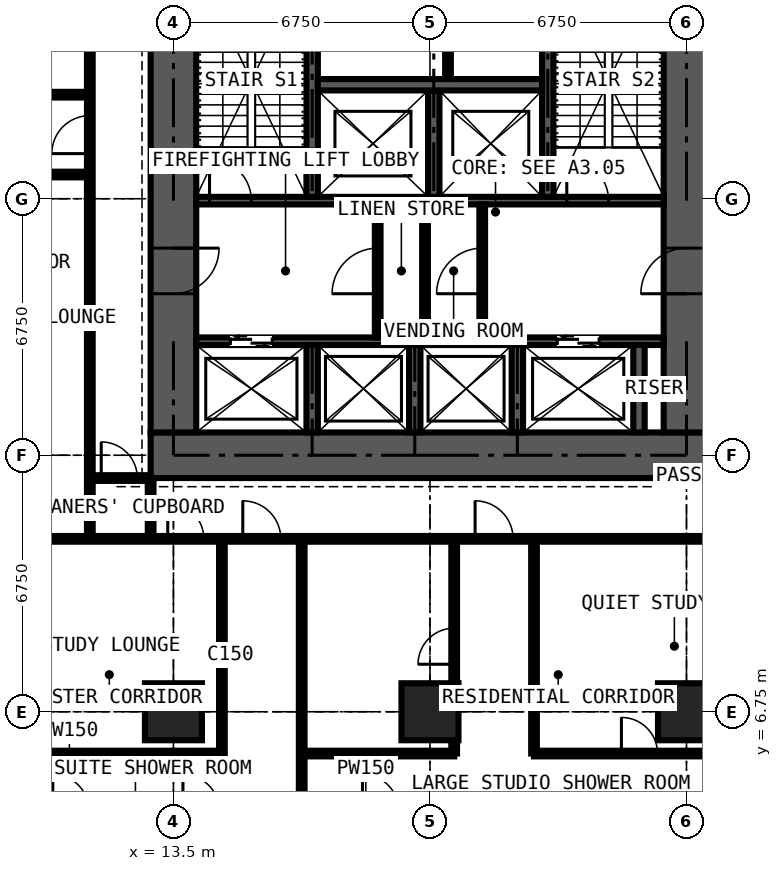
"""IFC4 building model, lengths in metres.
Left out: names, types, materials, properties, quantities, classifications, styles, units other than length and angle.
Written with IfcOpenShell. Run it as: python <this file> out.ifc"""

import sys

from ifc_helpers import new_model, si_unit, direction, frame, frame_2d, origin, origin_2d, place, context, subcontext, project, spatial, rectangle, extrude, element, fill, save


model = new_model("IFC4")
c1 = context("Model", 3, precision=1e-05, world=origin(), true_north=direction((0.0, 1.0)))
c2 = subcontext(c1, "Body", "Model", "MODEL_VIEW")
j1 = project(units=[si_unit("LENGTHUNIT", "METRE"), si_unit("PLANEANGLEUNIT", "RADIAN")], contexts=[c1])
p1 = place(None, origin())
s1 = spatial("IfcSite", under=j1, at=p1, CompositionType="ELEMENT")
p2 = place(p1, origin())
s2 = spatial("IfcBuilding", under=s1, at=p2, CompositionType="ELEMENT")
p3 = place(p2, frame((0.0, 0.0, 130.5)))
s3 = spatial("IfcBuildingStorey", under=s2, at=p3, CompositionType="ELEMENT", Elevation=130.5)
for number, where, z_axis, x_axis in (
    (1, (13.5, 6.75, 0.0), (0.0, 0.0, 1.0), (1.0, 0.0, 0.0)),
    (2, (20.25, 6.75, 0.0), (0.0, 0.0, 1.0), (1.0, 0.0, 0.0)),
    (3, (27.0, 6.75, 0.0), (0.0, 0.0, 1.0), (1.0, 0.0, 0.0)),
):
    element("IfcColumn", number, at=place(p3, frame(where, z_axis=z_axis, x_axis=x_axis)), inside=s3, PredefinedType="COLUMN", context=c2, shape_type="SweptSolid", body=[
        extrude(rectangle(XDim=1.5, YDim=1.5, at=origin_2d()), origin(), (0.0, 0.0, 1.0), 3.6),
    ])
p4 = place(p3, frame((12.9, 13.5, 0.0), z_axis=(0.0, 0.0, 1.0), x_axis=(1.0, 0.0, 0.0)))
e4 = element("IfcWall", 4, at=p4, inside=s3, PredefinedType="SHEAR", context=c2, shape_type="SweptSolid", body=[
    extrude(rectangle(XDim=14.7, YDim=1.2, at=frame_2d((7.35, 0.0))), origin(), (0.0, 0.0, 1.0), 3.6),
])
p5 = place(p3, frame((27.0, 14.1, 0.0), z_axis=(0.0, 0.0, 1.0), x_axis=(0.0, 1.0, 0.0)))
e5 = element("IfcWall", 5, at=p5, inside=s3, PredefinedType="SHEAR", context=c2, shape_type="SweptSolid", body=[
    extrude(rectangle(XDim=12.3, YDim=1.2, at=frame_2d((6.15, 0.0))), origin(), (0.0, 0.0, 1.0), 3.6),
])
p6 = place(p5, frame((3.65, 0.0, 0.0)))
e6 = element("IfcOpeningElement", 6, at=p6, cuts=e5, PredefinedType="OPENING", context=c2, shape_type="SweptSolid", body=[
    extrude(rectangle(XDim=1.2, YDim=2.2, at=frame_2d((0.6, 1.1))), frame((0.0, 0.61, 0.0), z_axis=(0.0, -1.0, 0.0), x_axis=(1.0, 0.0, 0.0)), (0.0, 0.0, 1.0), 1.22),
])
p7 = place(p3, frame((13.5, 26.4, 0.0), z_axis=(0.0, 0.0, 1.0), x_axis=(0.0, -1.0, 0.0)))
e7 = element("IfcWall", 7, at=p7, inside=s3, PredefinedType="SHEAR", context=c2, shape_type="SweptSolid", body=[
    extrude(rectangle(XDim=12.3, YDim=1.2, at=frame_2d((6.15, 0.0))), origin(), (0.0, 0.0, 1.0), 3.6),
])
p8 = place(p7, frame((7.45, 0.0, 0.0)))
e8 = element("IfcOpeningElement", 8, at=p8, cuts=e7, PredefinedType="OPENING", context=c2, shape_type="SweptSolid", body=[
    extrude(rectangle(XDim=1.2, YDim=2.2, at=frame_2d((0.6, 1.1))), frame((0.0, 0.61, 0.0), z_axis=(0.0, -1.0, 0.0), x_axis=(1.0, 0.0, 0.0)), (0.0, 0.0, 1.0), 1.22),
])
p9 = place(p3, frame((14.1, 16.5, 0.0), z_axis=(0.0, 0.0, 1.0), x_axis=(1.0, 0.0, 0.0)))
e9 = element("IfcWall", 9, at=p9, inside=s3, PredefinedType="SHEAR", context=c2, shape_type="SweptSolid", body=[
    extrude(rectangle(XDim=12.3, YDim=0.2, at=frame_2d((6.15, 0.0))), origin(), (0.0, 0.0, 1.0), 3.6),
])
p10 = place(p9, frame((0.9, 0.0, 0.0)))
e10 = element("IfcOpeningElement", 10, at=p10, cuts=e9, PredefinedType="OPENING", context=c2, shape_type="SweptSolid", body=[
    extrude(rectangle(XDim=1.1, YDim=2.2, at=frame_2d((0.55, 1.1))), frame((0.0, 0.11, 0.0), z_axis=(0.0, -1.0, 0.0), x_axis=(1.0, 0.0, 0.0)), (0.0, 0.0, 1.0), 0.22),
])
p11 = place(p9, frame((9.5, 0.0, 0.0)))
e11 = element("IfcOpeningElement", 11, at=p11, cuts=e9, PredefinedType="OPENING", context=c2, shape_type="SweptSolid", body=[
    extrude(rectangle(XDim=1.1, YDim=2.2, at=frame_2d((0.55, 1.1))), frame((0.0, 0.11, 0.0), z_axis=(0.0, -1.0, 0.0), x_axis=(1.0, 0.0, 0.0)), (0.0, 0.0, 1.0), 0.22),
])
p12 = place(p3, frame((14.1, 20.2, 0.0), z_axis=(0.0, 0.0, 1.0), x_axis=(1.0, 0.0, 0.0)))
e12 = element("IfcWall", 12, at=p12, inside=s3, PredefinedType="SHEAR", context=c2, shape_type="SweptSolid", body=[
    extrude(rectangle(XDim=12.3, YDim=0.2, at=frame_2d((6.15, 0.0))), origin(), (0.0, 0.0, 1.0), 3.6),
])
p13 = place(p12, frame((0.35, 0.0, 0.0)))
e13 = element("IfcOpeningElement", 13, at=p13, cuts=e12, PredefinedType="OPENING", context=c2, shape_type="SweptSolid", body=[
    extrude(rectangle(XDim=1.1, YDim=2.2, at=frame_2d((0.55, 1.1))), frame((0.0, 0.11, 0.0), z_axis=(0.0, -1.0, 0.0), x_axis=(1.0, 0.0, 0.0)), (0.0, 0.0, 1.0), 0.22),
])
p14 = place(p12, frame((9.75, 0.0, 0.0)))
e14 = element("IfcOpeningElement", 14, at=p14, cuts=e12, PredefinedType="OPENING", context=c2, shape_type="SweptSolid", body=[
    extrude(rectangle(XDim=1.1, YDim=2.2, at=frame_2d((0.55, 1.1))), frame((0.0, 0.11, 0.0), z_axis=(0.0, -1.0, 0.0), x_axis=(1.0, 0.0, 0.0)), (0.0, 0.0, 1.0), 0.22),
])
for number, where, z_axis, x_axis in (
    (15, (17.15, 20.3, 0.0), (0.0, 0.0, 1.0), (0.0, 1.0, 0.0)),
    (16, (23.35, 20.3, 0.0), (0.0, 0.0, 1.0), (0.0, 1.0, 0.0)),
):
    element("IfcWall", number, at=place(p3, frame(where, z_axis=z_axis, x_axis=x_axis)), inside=s3, PredefinedType="SHEAR", context=c2, shape_type="SweptSolid", body=[
        extrude(rectangle(XDim=6.1, YDim=0.3, at=frame_2d((3.05, 0.0))), origin(), (0.0, 0.0, 1.0), 3.6),
    ])
p15 = place(p3, frame((20.35, 20.3, 0.0), z_axis=(0.0, 0.0, 1.0), x_axis=(0.0, 1.0, 0.0)))
e17 = element("IfcWall", 17, at=p15, inside=s3, PredefinedType="SHEAR", context=c2, shape_type="SweptSolid", body=[
    extrude(rectangle(XDim=2.8, YDim=0.3, at=frame_2d((1.4, 0.0))), origin(), (0.0, 0.0, 1.0), 3.6),
])
p16 = place(p3, frame((17.3, 23.25, 0.0), z_axis=(0.0, 0.0, 1.0), x_axis=(1.0, 0.0, 0.0)))
e18 = element("IfcWall", 18, at=p16, inside=s3, PredefinedType="SHEAR", context=c2, shape_type="SweptSolid", body=[
    extrude(rectangle(XDim=5.9, YDim=0.3, at=frame_2d((2.95, 0.0))), origin(), (0.0, 0.0, 1.0), 3.6),
])
for number, where, z_axis, x_axis in (
    (19, (17.15, 14.1, 0.0), (0.0, 0.0, 1.0), (0.0, 1.0, 0.0)),
    (20, (19.85, 14.1, 0.0), (0.0, 0.0, 1.0), (0.0, 1.0, 0.0)),
    (21, (22.55, 14.1, 0.0), (0.0, 0.0, 1.0), (0.0, 1.0, 0.0)),
    (22, (25.75, 14.1, 0.0), (0.0, 0.0, 1.0), (0.0, 1.0, 0.0)),
):
    element("IfcWall", number, at=place(p3, frame(where, z_axis=z_axis, x_axis=x_axis)), inside=s3, PredefinedType="SHEAR", context=c2, shape_type="SweptSolid", body=[
        extrude(rectangle(XDim=2.3, YDim=0.3, at=frame_2d((1.15, 0.0))), origin(), (0.0, 0.0, 1.0), 3.6),
    ])
p17 = place(p3, frame((18.875, 16.6, 0.0), z_axis=(0.0, 0.0, 1.0), x_axis=(0.0, 1.0, 0.0)))
e23 = element("IfcWall", 23, at=p17, inside=s3, PredefinedType="PARTITIONING", context=c2, shape_type="SweptSolid", body=[
    extrude(rectangle(XDim=3.5, YDim=0.15, at=frame_2d((1.75, 0.0))), origin(), (0.0, 0.0, 1.0), 3.375),
])
p18 = place(p17, frame((1.15, 0.0, 0.0)))
e24 = element("IfcOpeningElement", 24, at=p18, cuts=e23, PredefinedType="OPENING", context=c2, shape_type="SweptSolid", body=[
    extrude(rectangle(XDim=1.2, YDim=2.2, at=frame_2d((0.6, 1.1))), frame((0.0, 0.085, 0.0), z_axis=(0.0, -1.0, 0.0), x_axis=(1.0, 0.0, 0.0)), (0.0, 0.0, 1.0), 0.17),
])
p19 = place(p3, frame((21.625, 16.6, 0.0), z_axis=(0.0, 0.0, 1.0), x_axis=(0.0, 1.0, 0.0)))
e25 = element("IfcWall", 25, at=p19, inside=s3, PredefinedType="PARTITIONING", context=c2, shape_type="SweptSolid", body=[
    extrude(rectangle(XDim=3.5, YDim=0.15, at=frame_2d((1.75, 0.0))), origin(), (0.0, 0.0, 1.0), 3.375),
])
p20 = place(p19, frame((1.15, 0.0, 0.0)))
e26 = element("IfcOpeningElement", 26, at=p20, cuts=e25, PredefinedType="OPENING", context=c2, shape_type="SweptSolid", body=[
    extrude(rectangle(XDim=1.2, YDim=2.2, at=frame_2d((0.6, 1.1))), frame((0.0, 0.085, 0.0), z_axis=(0.0, -1.0, 0.0), x_axis=(1.0, 0.0, 0.0)), (0.0, 0.0, 1.0), 0.17),
])
p21 = place(p3, frame((20.12, 16.6, 0.0), z_axis=(0.0, 0.0, 1.0), x_axis=(0.0, 1.0, 0.0)))
e27 = element("IfcWall", 27, at=p21, inside=s3, PredefinedType="PARTITIONING", context=c2, shape_type="SweptSolid", body=[
    extrude(rectangle(XDim=3.5, YDim=0.15, at=frame_2d((1.75, 0.0))), origin(), (0.0, 0.0, 1.0), 3.375),
])
p22 = place(p3, frame((20.725, 23.4, 0.0), z_axis=(0.0, 0.0, 1.0), x_axis=(0.0, 1.0, 0.0)))
e28 = element("IfcWall", 28, at=p22, inside=s3, PredefinedType="PARTITIONING", context=c2, shape_type="SweptSolid", body=[
    extrude(rectangle(XDim=3.0, YDim=0.15, at=frame_2d((1.5, 0.0))), origin(), (0.0, 0.0, 1.0), 3.375),
])
p23 = place(p3, frame((5.65, 20.887, 0.0), z_axis=(0.0, 0.0, 1.0), x_axis=(1.0, 0.0, 0.0)))
e29 = element("IfcWall", 29, at=p23, inside=s3, PredefinedType="PARTITIONING", context=c2, shape_type="SweptSolid", body=[
    extrude(rectangle(XDim=5.65, YDim=0.15, at=frame_2d((2.825, 0.0))), origin(), (0.0, 0.0, 1.0), 3.375),
])
p24 = place(p3, frame((5.65, 22.988, 0.0), z_axis=(0.0, 0.0, 1.0), x_axis=(1.0, 0.0, 0.0)))
e30 = element("IfcWall", 30, at=p24, inside=s3, PredefinedType="PARTITIONING", context=c2, shape_type="SweptSolid", body=[
    extrude(rectangle(XDim=5.65, YDim=0.15, at=frame_2d((2.825, 0.0))), origin(), (0.0, 0.0, 1.0), 3.375),
])
p25 = place(p24, frame((2.35, 0.0, 0.0)))
e31 = element("IfcOpeningElement", 31, at=p25, cuts=e30, PredefinedType="OPENING", context=c2, shape_type="SweptSolid", body=[
    extrude(rectangle(XDim=0.95, YDim=2.2, at=frame_2d((0.475, 1.1))), frame((0.0, 0.085, 0.0), z_axis=(0.0, -1.0, 0.0), x_axis=(1.0, 0.0, 0.0)), (0.0, 0.0, 1.0), 0.17),
])
p26 = place(p3, frame((6.75, 5.65, 0.0), z_axis=(0.0, 0.0, 1.0), x_axis=(1.0, 0.0, 0.0)))
e32 = element("IfcWall", 32, at=p26, inside=s3, PredefinedType="PARTITIONING", context=c2, shape_type="SweptSolid", body=[
    extrude(rectangle(XDim=8.025, YDim=0.15, at=frame_2d((4.012, 0.0))), origin(), (0.0, 0.0, 1.0), 3.375),
])
p27 = place(p3, frame((10.125, 11.3, 0.0), z_axis=(0.0, 0.0, 1.0), x_axis=(1.0, 0.0, 0.0)))
e33 = element("IfcWall", 33, at=p27, inside=s3, PredefinedType="PARTITIONING", context=c2, shape_type="SweptSolid", body=[
    extrude(rectangle(XDim=20.675, YDim=0.15, at=frame_2d((10.337, 0.0))), origin(), (0.0, 0.0, 1.0), 3.375),
])
p28 = place(p27, frame((5.2, 0.0, 0.0)))
e34 = element("IfcOpeningElement", 34, at=p28, cuts=e33, PredefinedType="OPENING", context=c2, shape_type="SweptSolid", body=[
    extrude(rectangle(XDim=1.0, YDim=2.2, at=frame_2d((0.5, 1.1))), frame((0.0, 0.085, 0.0), z_axis=(0.0, -1.0, 0.0), x_axis=(1.0, 0.0, 0.0)), (0.0, 0.0, 1.0), 0.17),
])
p29 = place(p27, frame((11.312, 0.0, 0.0)))
e35 = element("IfcOpeningElement", 35, at=p29, cuts=e33, PredefinedType="OPENING", context=c2, shape_type="SweptSolid", body=[
    extrude(rectangle(XDim=1.0, YDim=2.2, at=frame_2d((0.5, 1.1))), frame((0.0, 0.085, 0.0), z_axis=(0.0, -1.0, 0.0), x_axis=(1.0, 0.0, 0.0)), (0.0, 0.0, 1.0), 0.17),
])
p30 = place(p27, frame((3.225, 0.0, 0.0)))
e36 = element("IfcOpeningElement", 36, at=p30, cuts=e33, PredefinedType="OPENING", context=c2, shape_type="SweptSolid", body=[
    extrude(rectangle(XDim=0.95, YDim=2.2, at=frame_2d((0.475, 1.1))), frame((0.0, 0.085, 0.0), z_axis=(0.0, -1.0, 0.0), x_axis=(1.0, 0.0, 0.0)), (0.0, 0.0, 1.0), 0.17),
])
p31 = place(p3, frame((11.3, 11.3, 0.0), z_axis=(0.0, 0.0, 1.0), x_axis=(0.0, 1.0, 0.0)))
e37 = element("IfcWall", 37, at=p31, inside=s3, PredefinedType="PARTITIONING", context=c2, shape_type="SweptSolid", body=[
    extrude(rectangle(XDim=19.3, YDim=0.15, at=frame_2d((9.65, 0.0))), origin(), (0.0, 0.0, 1.0), 3.375),
])
p32 = place(p31, frame((18.1, 0.0, 0.0)))
e38 = element("IfcOpeningElement", 38, at=p32, cuts=e37, PredefinedType="OPENING", context=c2, shape_type="SweptSolid", body=[
    extrude(rectangle(XDim=1.0, YDim=2.2, at=frame_2d((0.5, 1.1))), frame((0.0, 0.085, 0.0), z_axis=(0.0, -1.0, 0.0), x_axis=(1.0, 0.0, 0.0)), (0.0, 0.0, 1.0), 0.17),
])
p33 = place(p31, frame((10.137, 0.0, 0.0)))
e39 = element("IfcOpeningElement", 39, at=p33, cuts=e37, PredefinedType="OPENING", context=c2, shape_type="SweptSolid", body=[
    extrude(rectangle(XDim=1.0, YDim=2.2, at=frame_2d((0.5, 1.1))), frame((0.0, 0.085, 0.0), z_axis=(0.0, -1.0, 0.0), x_axis=(1.0, 0.0, 0.0)), (0.0, 0.0, 1.0), 0.17),
])
p34 = place(p3, frame((11.3, 12.9, 0.0), z_axis=(0.0, 0.0, 1.0), x_axis=(1.0, 0.0, 0.0)))
e40 = element("IfcWall", 40, at=p34, inside=s3, PredefinedType="PARTITIONING", context=c2, shape_type="SweptSolid", body=[
    extrude(rectangle(XDim=1.6, YDim=0.15, at=frame_2d((0.8, 0.0))), origin(), (0.0, 0.0, 1.0), 2.806),
])
p35 = place(p34, frame((0.3, 0.0, 0.0)))
e41 = element("IfcOpeningElement", 41, at=p35, cuts=e40, PredefinedType="OPENING", context=c2, shape_type="SweptSolid", body=[
    extrude(rectangle(XDim=0.95, YDim=2.2, at=frame_2d((0.475, 1.1))), frame((0.0, 0.085, 0.0), z_axis=(0.0, -1.0, 0.0), x_axis=(1.0, 0.0, 0.0)), (0.0, 0.0, 1.0), 0.17),
])
p36 = place(p3, frame((12.9, 11.3, 0.0), z_axis=(0.0, 0.0, 1.0), x_axis=(0.0, 1.0, 0.0)))
e42 = element("IfcWall", 42, at=p36, inside=s3, PredefinedType="PARTITIONING", context=c2, shape_type="SweptSolid", body=[
    extrude(rectangle(XDim=1.6, YDim=0.15, at=frame_2d((0.8, 0.0))), origin(), (0.0, 0.0, 1.0), 3.375),
])
p37 = place(p3, frame((14.775, 5.65, 0.0), z_axis=(0.0, 0.0, 1.0), x_axis=(0.0, 1.0, 0.0)))
e43 = element("IfcWall", 43, at=p37, inside=s3, PredefinedType="PARTITIONING", context=c2, shape_type="SweptSolid", body=[
    extrude(rectangle(XDim=5.65, YDim=0.15, at=frame_2d((2.825, 0.0))), origin(), (0.0, 0.0, 1.0), 3.375),
])
p38 = place(p3, frame((16.875, -0.734, 0.0), z_axis=(0.0, 0.0, 1.0), x_axis=(0.0, 1.0, 0.0)))
e44 = element("IfcWall", 44, at=p38, inside=s3, PredefinedType="PARTITIONING", context=c2, shape_type="SweptSolid", body=[
    extrude(rectangle(XDim=12.034, YDim=0.15, at=frame_2d((6.017, 0.0))), origin(), (0.0, 0.0, 1.0), 3.375),
])
p39 = place(p3, frame((16.875, 5.65, 0.0), z_axis=(0.0, 0.0, 1.0), x_axis=(1.0, 0.0, 0.0)))
e45 = element("IfcWall", 45, at=p39, inside=s3, PredefinedType="PARTITIONING", context=c2, shape_type="SweptSolid", body=[
    extrude(rectangle(XDim=4.012, YDim=0.15, at=frame_2d((2.006, 0.0))), origin(), (0.0, 0.0, 1.0), 3.375),
])
p40 = place(p3, frame((20.887, 5.65, 0.0), z_axis=(0.0, 0.0, 1.0), x_axis=(0.0, 1.0, 0.0)))
e46 = element("IfcWall", 46, at=p40, inside=s3, PredefinedType="PARTITIONING", context=c2, shape_type="SweptSolid", body=[
    extrude(rectangle(XDim=5.65, YDim=0.15, at=frame_2d((2.825, 0.0))), origin(), (0.0, 0.0, 1.0), 3.375),
])
p41 = place(p40, frame((2.35, 0.0, 0.0)))
e47 = element("IfcOpeningElement", 47, at=p41, cuts=e46, PredefinedType="OPENING", context=c2, shape_type="SweptSolid", body=[
    extrude(rectangle(XDim=0.95, YDim=2.2, at=frame_2d((0.475, 1.1))), frame((0.0, 0.085, 0.0), z_axis=(0.0, -1.0, 0.0), x_axis=(1.0, 0.0, 0.0)), (0.0, 0.0, 1.0), 0.17),
])
p42 = place(p3, frame((22.988, 5.65, 0.0), z_axis=(0.0, 0.0, 1.0), x_axis=(1.0, 0.0, 0.0)))
e48 = element("IfcWall", 48, at=p42, inside=s3, PredefinedType="PARTITIONING", context=c2, shape_type="SweptSolid", body=[
    extrude(rectangle(XDim=7.387, YDim=0.15, at=frame_2d((3.694, 0.0))), origin(), (0.0, 0.0, 1.0), 3.375),
])
p43 = place(p42, frame((2.3, 0.0, 0.0)))
e49 = element("IfcOpeningElement", 49, at=p43, cuts=e48, PredefinedType="OPENING", context=c2, shape_type="SweptSolid", body=[
    extrude(rectangle(XDim=0.95, YDim=2.2, at=frame_2d((0.475, 1.1))), frame((0.0, 0.085, 0.0), z_axis=(0.0, -1.0, 0.0), x_axis=(1.0, 0.0, 0.0)), (0.0, 0.0, 1.0), 0.17),
])
p44 = place(p3, frame((22.988, 5.65, 0.0), z_axis=(0.0, 0.0, 1.0), x_axis=(0.0, 1.0, 0.0)))
e50 = element("IfcWall", 50, at=p44, inside=s3, PredefinedType="PARTITIONING", context=c2, shape_type="SweptSolid", body=[
    extrude(rectangle(XDim=5.65, YDim=0.15, at=frame_2d((2.825, 0.0))), origin(), (0.0, 0.0, 1.0), 3.375),
])
p45 = place(p10, origin())
e51 = element("IfcDoor", 51, at=p45, inside=s3, OperationType="DOUBLE_DOOR_SLIDING", PredefinedType="DOOR", context=c2, shape_type="SweptSolid", body=[
    extrude(rectangle(XDim=1.1, YDim=2.2, at=frame_2d((0.55, 1.1))), frame((0.0, 0.025, 0.0), z_axis=(0.0, -1.0, 0.0), x_axis=(1.0, 0.0, 0.0)), (0.0, 0.0, 1.0), 0.05),
])
fill(e10, e51)
p46 = place(p11, origin())
e52 = element("IfcDoor", 52, at=p46, inside=s3, OperationType="DOUBLE_DOOR_SLIDING", PredefinedType="DOOR", context=c2, shape_type="SweptSolid", body=[
    extrude(rectangle(XDim=1.1, YDim=2.2, at=frame_2d((0.55, 1.1))), frame((0.0, 0.025, 0.0), z_axis=(0.0, -1.0, 0.0), x_axis=(1.0, 0.0, 0.0)), (0.0, 0.0, 1.0), 0.05),
])
fill(e11, e52)
p47 = place(p8, origin())
e53 = element("IfcDoor", 53, at=p47, inside=s3, OperationType="DOUBLE_DOOR_SINGLE_SWING", PredefinedType="DOOR", context=c2, shape_type="SweptSolid", body=[
    extrude(rectangle(XDim=1.2, YDim=2.2, at=frame_2d((0.6, 1.1))), frame((0.0, 0.025, 0.0), z_axis=(0.0, -1.0, 0.0), x_axis=(1.0, 0.0, 0.0)), (0.0, 0.0, 1.0), 0.05),
])
fill(e8, e53)
p48 = place(p6, origin())
e54 = element("IfcDoor", 54, at=p48, inside=s3, OperationType="DOUBLE_DOOR_SINGLE_SWING", PredefinedType="DOOR", context=c2, shape_type="SweptSolid", body=[
    extrude(rectangle(XDim=1.2, YDim=2.2, at=frame_2d((0.6, 1.1))), frame((0.0, 0.025, 0.0), z_axis=(0.0, -1.0, 0.0), x_axis=(1.0, 0.0, 0.0)), (0.0, 0.0, 1.0), 0.05),
])
fill(e6, e54)
p49 = place(p18, origin())
e55 = element("IfcDoor", 55, at=p49, inside=s3, OperationType="DOUBLE_DOOR_SINGLE_SWING", PredefinedType="DOOR", context=c2, shape_type="SweptSolid", body=[
    extrude(rectangle(XDim=1.2, YDim=2.2, at=frame_2d((0.6, 1.1))), frame((0.0, 0.025, 0.0), z_axis=(0.0, -1.0, 0.0), x_axis=(1.0, 0.0, 0.0)), (0.0, 0.0, 1.0), 0.05),
])
fill(e24, e55)
p50 = place(p20, origin())
e56 = element("IfcDoor", 56, at=p50, inside=s3, OperationType="DOUBLE_DOOR_SINGLE_SWING", PredefinedType="DOOR", context=c2, shape_type="SweptSolid", body=[
    extrude(rectangle(XDim=1.2, YDim=2.2, at=frame_2d((0.6, 1.1))), frame((0.0, 0.025, 0.0), z_axis=(0.0, -1.0, 0.0), x_axis=(1.0, 0.0, 0.0)), (0.0, 0.0, 1.0), 0.05),
])
fill(e26, e56)
p51 = place(p13, origin())
e57 = element("IfcDoor", 57, at=p51, inside=s3, OperationType="SINGLE_SWING_LEFT", PredefinedType="DOOR", context=c2, shape_type="SweptSolid", body=[
    extrude(rectangle(XDim=1.1, YDim=2.2, at=frame_2d((0.55, 1.1))), frame((0.0, 0.025, 0.0), z_axis=(0.0, -1.0, 0.0), x_axis=(1.0, 0.0, 0.0)), (0.0, 0.0, 1.0), 0.05),
])
fill(e13, e57)
p52 = place(p14, origin())
e58 = element("IfcDoor", 58, at=p52, inside=s3, OperationType="SINGLE_SWING_LEFT", PredefinedType="DOOR", context=c2, shape_type="SweptSolid", body=[
    extrude(rectangle(XDim=1.1, YDim=2.2, at=frame_2d((0.55, 1.1))), frame((0.0, 0.025, 0.0), z_axis=(0.0, -1.0, 0.0), x_axis=(1.0, 0.0, 0.0)), (0.0, 0.0, 1.0), 0.05),
])
fill(e14, e58)
p53 = place(p35, origin())
e59 = element("IfcDoor", 59, at=p53, inside=s3, OperationType="SINGLE_SWING_LEFT", PredefinedType="DOOR", context=c2, shape_type="SweptSolid", body=[
    extrude(rectangle(XDim=0.95, YDim=2.2, at=frame_2d((0.475, 1.1))), frame((0.0, 0.025, 0.0), z_axis=(0.0, -1.0, 0.0), x_axis=(1.0, 0.0, 0.0)), (0.0, 0.0, 1.0), 0.05),
])
fill(e41, e59)
p54 = place(p28, origin())
e60 = element("IfcDoor", 60, at=p54, inside=s3, OperationType="SINGLE_SWING_LEFT", PredefinedType="DOOR", context=c2, shape_type="SweptSolid", body=[
    extrude(rectangle(XDim=1.0, YDim=2.2, at=frame_2d((0.5, 1.1))), frame((0.0, 0.025, 0.0), z_axis=(0.0, -1.0, 0.0), x_axis=(1.0, 0.0, 0.0)), (0.0, 0.0, 1.0), 0.05),
])
fill(e34, e60)
p55 = place(p29, origin())
e61 = element("IfcDoor", 61, at=p55, inside=s3, OperationType="SINGLE_SWING_LEFT", PredefinedType="DOOR", context=c2, shape_type="SweptSolid", body=[
    extrude(rectangle(XDim=1.0, YDim=2.2, at=frame_2d((0.5, 1.1))), frame((0.0, 0.025, 0.0), z_axis=(0.0, -1.0, 0.0), x_axis=(1.0, 0.0, 0.0)), (0.0, 0.0, 1.0), 0.05),
])
fill(e35, e61)
p56 = place(p30, origin())
e62 = element("IfcDoor", 62, at=p56, inside=s3, OperationType="SINGLE_SWING_LEFT", PredefinedType="DOOR", context=c2, shape_type="SweptSolid", body=[
    extrude(rectangle(XDim=0.95, YDim=2.2, at=frame_2d((0.475, 1.1))), frame((0.0, 0.025, 0.0), z_axis=(0.0, -1.0, 0.0), x_axis=(1.0, 0.0, 0.0)), (0.0, 0.0, 1.0), 0.05),
])
fill(e36, e62)
p57 = place(p43, origin())
e63 = element("IfcDoor", 63, at=p57, inside=s3, OperationType="SINGLE_SWING_LEFT", PredefinedType="DOOR", context=c2, shape_type="SweptSolid", body=[
    extrude(rectangle(XDim=0.95, YDim=2.2, at=frame_2d((0.475, 1.1))), frame((0.0, 0.025, 0.0), z_axis=(0.0, -1.0, 0.0), x_axis=(1.0, 0.0, 0.0)), (0.0, 0.0, 1.0), 0.05),
])
fill(e49, e63)
p58 = place(p41, origin())
e64 = element("IfcDoor", 64, at=p58, inside=s3, OperationType="SINGLE_SWING_LEFT", PredefinedType="DOOR", context=c2, shape_type="SweptSolid", body=[
    extrude(rectangle(XDim=0.95, YDim=2.2, at=frame_2d((0.475, 1.1))), frame((0.0, 0.025, 0.0), z_axis=(0.0, -1.0, 0.0), x_axis=(1.0, 0.0, 0.0)), (0.0, 0.0, 1.0), 0.05),
])
fill(e47, e64)
p59 = place(p33, origin())
e65 = element("IfcDoor", 65, at=p59, inside=s3, OperationType="SINGLE_SWING_LEFT", PredefinedType="DOOR", context=c2, shape_type="SweptSolid", body=[
    extrude(rectangle(XDim=1.0, YDim=2.2, at=frame_2d((0.5, 1.1))), frame((0.0, 0.025, 0.0), z_axis=(0.0, -1.0, 0.0), x_axis=(1.0, 0.0, 0.0)), (0.0, 0.0, 1.0), 0.05),
])
fill(e39, e65)
save(model, sys.argv[1])
